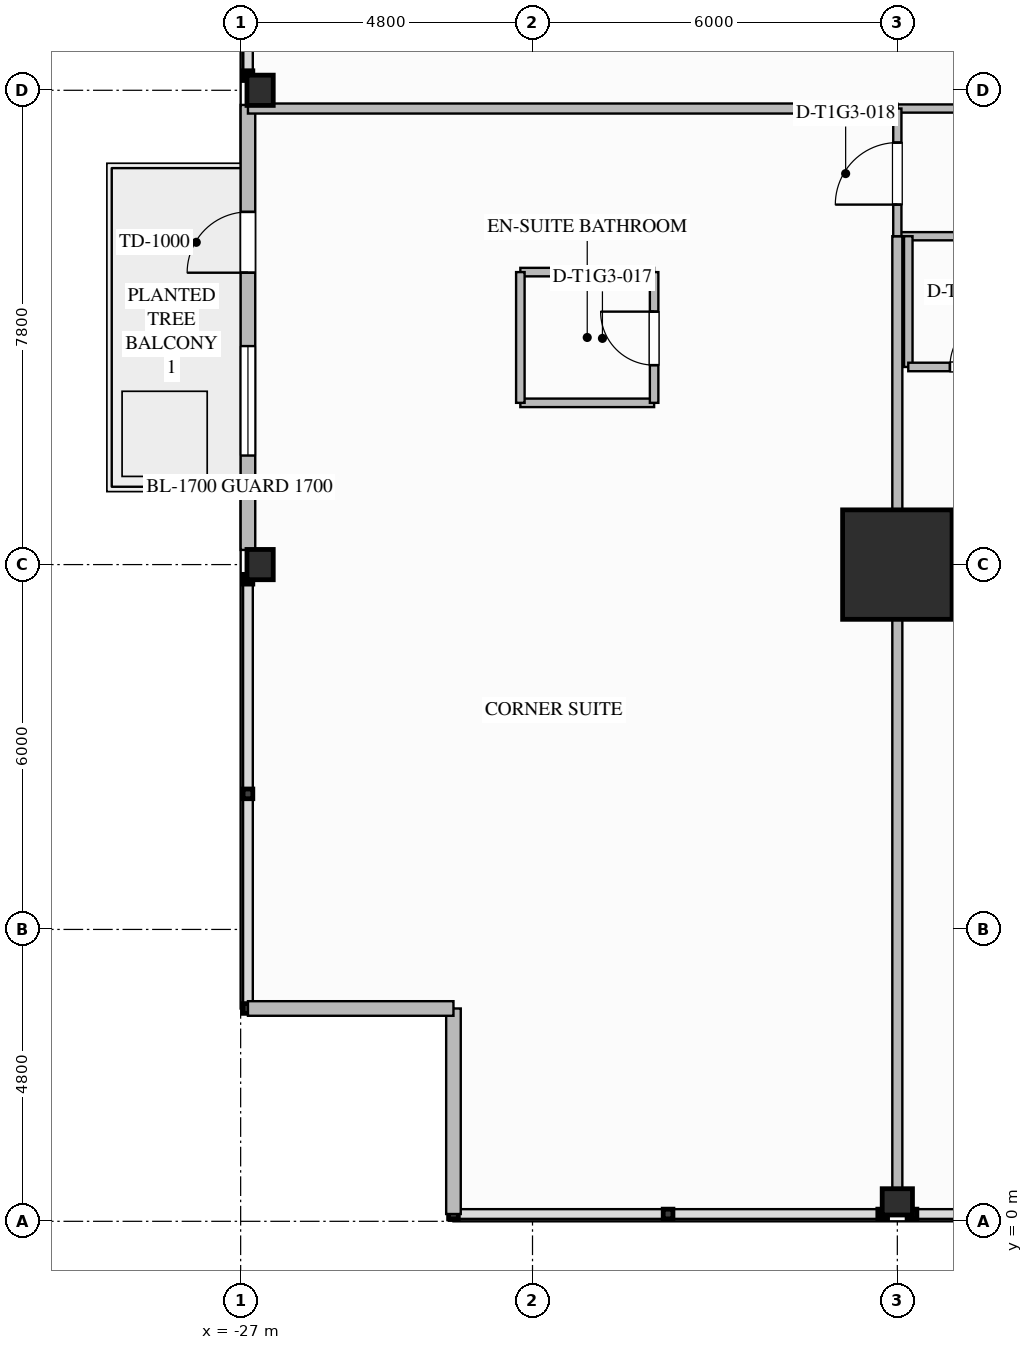
"""IFC4 building model, lengths in metres.
Left out: names, types, materials, properties, quantities, classifications, styles, units other than length and angle.
Written with IfcOpenShell. Run it as: python <this file> out.ifc"""

import sys

from ifc_helpers import new_model, si_unit, direction, frame, frame_2d, origin, origin_2d, place, context, subcontext, project, spatial, rectangle, i_section, extrude, element, fill, save


model = new_model("IFC4")
c1 = context("Model", 3, precision=1e-05, world=origin(), true_north=direction((0.0, 1.0)))
c2 = subcontext(c1, "Body", "Model", "MODEL_VIEW")
j1 = project(units=[si_unit("LENGTHUNIT", "METRE"), si_unit("PLANEANGLEUNIT", "RADIAN")], contexts=[c1])
p1 = place(None, origin())
s1 = spatial("IfcSite", under=j1, at=p1, CompositionType="ELEMENT")
p2 = place(p1, origin())
s2 = spatial("IfcBuilding", under=s1, at=p2, CompositionType="ELEMENT")
p3 = place(p2, frame((0.0, 0.0, 54.2)))
s3 = spatial("IfcBuildingStorey", under=s2, at=p3, CompositionType="ELEMENT", Elevation=54.2)
p4 = place(p3, frame((-16.2, 10.8, 0.0), z_axis=(0.0, 0.0, 1.0), x_axis=(1.0, 0.0, 0.0)))
e1 = element("IfcColumn", 1, at=p4, inside=s3, PredefinedType="COLUMN", context=c2, shape_type="SweptSolid", body=[
    extrude(rectangle(XDim=1.8, YDim=1.8, at=origin_2d()), origin(), (0.0, 0.0, 1.0), 3.5),
])
for number, where, z_axis, x_axis in (
    (2, (-26.68, 10.8, 0.0), (0.0, 0.0, 1.0), (1.0, 0.0, 0.0)),
    (3, (-26.68, 18.6, 0.0), (0.0, 0.0, 1.0), (1.0, 0.0, 0.0)),
    (4, (-16.2, 0.32, 0.0), (0.0, 0.0, 1.0), (0.0, 1.0, 0.0)),
):
    element("IfcColumn", number, at=place(p3, frame(where, z_axis=z_axis, x_axis=x_axis)), inside=s3, PredefinedType="COLUMN", context=c2, shape_type="SweptSolid", body=[
        extrude(i_section(OverallWidth=0.432, OverallDepth=0.498, WebThickness=0.056, FlangeThickness=0.089, FilletRadius=0.03, at=origin_2d()), origin(), (0.0, 0.0, 1.0), 3.497),
    ])
p5 = place(p3, frame((-26.88, 11.041, 0.0), z_axis=(0.0, 0.0, 1.0), x_axis=(0.0, 1.0, 0.0)))
e5 = element("IfcWall", 5, at=p5, inside=s3, PredefinedType="STANDARD", context=c2, shape_type="SweptSolid", body=[
    extrude(rectangle(XDim=7.318, YDim=0.24, at=frame_2d((3.659, 0.0))), origin(), (0.0, 0.0, 1.0), 2.629),
])
p6 = place(p5, frame((4.559, 0.0, 0.0)))
e6 = element("IfcOpeningElement", 6, at=p6, cuts=e5, PredefinedType="OPENING", context=c2, shape_type="SweptSolid", body=[
    extrude(rectangle(XDim=1.0, YDim=2.2, at=frame_2d((0.5, 1.1))), frame((0.0, 0.13, 0.0), z_axis=(0.0, -1.0, 0.0), x_axis=(1.0, 0.0, 0.0)), (0.0, 0.0, 1.0), 0.26),
])
p7 = place(p5, frame((1.552, 0.0, 0.75)))
e7 = element("IfcOpeningElement", 7, at=p7, cuts=e5, PredefinedType="OPENING", context=c2, shape_type="SweptSolid", body=[
    extrude(rectangle(XDim=1.8, YDim=1.779, at=frame_2d((0.9, 0.89))), frame((0.0, 0.13, 0.0), z_axis=(0.0, -1.0, 0.0), x_axis=(1.0, 0.0, 0.0)), (0.0, 0.0, 1.0), 0.26),
])
for number, where, z_axis, x_axis in (
    (8, (-23.5, 0.12, 0.0), (0.0, 0.0, 1.0), (0.0, 1.0, 0.0)),
    (9, (-23.5, 3.5, 0.0), (0.0, 0.0, 1.0), (-1.0, 0.0, 0.0)),
):
    element("IfcWall", number, at=place(p3, frame(where, z_axis=z_axis, x_axis=x_axis)), inside=s3, PredefinedType="STANDARD", context=c2, shape_type="SweptSolid", body=[
        extrude(rectangle(XDim=3.38, YDim=0.24, at=frame_2d((1.69, 0.0))), origin(), (0.0, 0.0, 1.0), 3.24),
    ])
p8 = place(p3, frame((-16.2, 16.2, 0.0), z_axis=(0.0, 0.0, 1.0), x_axis=(1.0, 0.0, 0.0)))
e10 = element("IfcWall", 10, at=p8, inside=s3, PredefinedType="PARTITIONING", context=c2, shape_type="SweptSolid", body=[
    extrude(rectangle(XDim=32.4, YDim=0.135, at=frame_2d((16.2, 0.0))), origin(), (0.0, 0.0, 1.0), 3.24),
])
p9 = place(p8, frame((3.285, 0.0, 0.0)))
e11 = element("IfcOpeningElement", 11, at=p9, cuts=e10, PredefinedType="OPENING", context=c2, shape_type="SweptSolid", body=[
    extrude(rectangle(XDim=1.26, YDim=2.2, at=frame_2d((0.63, 1.1))), frame((0.0, 0.077, 0.0), z_axis=(0.0, -1.0, 0.0), x_axis=(1.0, 0.0, 0.0)), (0.0, 0.0, 1.0), 0.155),
])
p10 = place(p8, frame((7.335, 0.0, 0.0)))
e12 = element("IfcOpeningElement", 12, at=p10, cuts=e10, PredefinedType="OPENING", context=c2, shape_type="SweptSolid", body=[
    extrude(rectangle(XDim=1.26, YDim=2.2, at=frame_2d((0.63, 1.1))), frame((0.0, 0.077, 0.0), z_axis=(0.0, -1.0, 0.0), x_axis=(1.0, 0.0, 0.0)), (0.0, 0.0, 1.0), 0.155),
])
p11 = place(p8, frame((15.84, 0.0, 0.0)))
e13 = element("IfcOpeningElement", 13, at=p11, cuts=e10, PredefinedType="OPENING", context=c2, shape_type="SweptSolid", body=[
    extrude(rectangle(XDim=1.26, YDim=2.2, at=frame_2d((0.63, 1.1))), frame((0.0, 0.077, 0.0), z_axis=(0.0, -1.0, 0.0), x_axis=(1.0, 0.0, 0.0)), (0.0, 0.0, 1.0), 0.155),
])
p12 = place(p8, frame((20.835, 0.0, 0.0)))
e14 = element("IfcOpeningElement", 14, at=p12, cuts=e10, PredefinedType="OPENING", context=c2, shape_type="SweptSolid", body=[
    extrude(rectangle(XDim=1.26, YDim=2.2, at=frame_2d((0.63, 1.1))), frame((0.0, 0.077, 0.0), z_axis=(0.0, -1.0, 0.0), x_axis=(1.0, 0.0, 0.0)), (0.0, 0.0, 1.0), 0.155),
])
p13 = place(p8, frame((29.475, 0.0, 0.0)))
e15 = element("IfcOpeningElement", 15, at=p13, cuts=e10, PredefinedType="OPENING", context=c2, shape_type="SweptSolid", body=[
    extrude(rectangle(XDim=1.26, YDim=2.2, at=frame_2d((0.63, 1.1))), frame((0.0, 0.077, 0.0), z_axis=(0.0, -1.0, 0.0), x_axis=(1.0, 0.0, 0.0)), (0.0, 0.0, 1.0), 0.155),
])
p14 = place(p3, frame((-16.2, 18.3, 0.0), z_axis=(0.0, 0.0, 1.0), x_axis=(1.0, 0.0, 0.0)))
e16 = element("IfcWall", 16, at=p14, inside=s3, PredefinedType="PARTITIONING", context=c2, shape_type="SweptSolid", body=[
    extrude(rectangle(XDim=5.4, YDim=0.135, at=frame_2d((2.7, 0.0))), origin(), (0.0, 0.0, 1.0), 3.24),
])
p15 = place(p3, frame((-16.2, 0.12, 0.0), z_axis=(0.0, 0.0, 1.0), x_axis=(0.0, 1.0, 0.0)))
e17 = element("IfcWall", 17, at=p15, inside=s3, PredefinedType="PARTITIONING", context=c2, shape_type="SweptSolid", body=[
    extrude(rectangle(XDim=16.08, YDim=0.165, at=frame_2d((8.04, 0.0))), origin(), (0.0, 0.0, 1.0), 2.298),
])
p16 = place(p3, frame((-26.88, 18.3, 0.0), z_axis=(0.0, 0.0, 1.0), x_axis=(1.0, 0.0, 0.0)))
e18 = element("IfcWall", 18, at=p16, inside=s3, PredefinedType="PARTITIONING", context=c2, shape_type="SweptSolid", body=[
    extrude(rectangle(XDim=10.68, YDim=0.165, at=frame_2d((5.34, 0.0))), origin(), (0.0, 0.0, 1.0), 2.298),
])
p17 = place(p3, frame((-16.2, 16.2, 0.0), z_axis=(0.0, 0.0, 1.0), x_axis=(0.0, 1.0, 0.0)))
e19 = element("IfcWall", 19, at=p17, inside=s3, PredefinedType="PARTITIONING", context=c2, shape_type="SweptSolid", body=[
    extrude(rectangle(XDim=2.1, YDim=0.135, at=frame_2d((1.05, 0.0))), origin(), (0.0, 0.0, 1.0), 2.298),
])
p18 = place(p17, frame((0.52, 0.0, 0.0)))
e20 = element("IfcOpeningElement", 20, at=p18, cuts=e19, PredefinedType="OPENING", context=c2, shape_type="SweptSolid", body=[
    extrude(rectangle(XDim=1.02, YDim=2.15, at=frame_2d((0.51, 1.075))), frame((0.0, 0.077, 0.0), z_axis=(0.0, -1.0, 0.0), x_axis=(1.0, 0.0, 0.0)), (0.0, 0.0, 1.0), 0.155),
])
for number, where, z_axis, x_axis in (
    (21, (-22.4, 13.46, 0.0), (0.0, 0.0, 1.0), (1.0, 0.0, 0.0)),
    (22, (-22.4, 15.61, 0.0), (0.0, 0.0, 1.0), (1.0, 0.0, 0.0)),
):
    element("IfcWall", number, at=place(p3, frame(where, z_axis=z_axis, x_axis=x_axis)), inside=s3, PredefinedType="PLUMBINGWALL", context=c2, shape_type="SweptSolid", body=[
        extrude(rectangle(XDim=2.2, YDim=0.14, at=frame_2d((1.1, 0.0))), origin(), (0.0, 0.0, 1.0), 3.24),
    ])
p19 = place(p3, frame((-22.4, 13.46, 0.0), z_axis=(0.0, 0.0, 1.0), x_axis=(0.0, 1.0, 0.0)))
e23 = element("IfcWall", 23, at=p19, inside=s3, PredefinedType="PLUMBINGWALL", context=c2, shape_type="SweptSolid", body=[
    extrude(rectangle(XDim=2.15, YDim=0.14, at=frame_2d((1.075, 0.0))), origin(), (0.0, 0.0, 1.0), 3.24),
])
p20 = place(p3, frame((-20.2, 13.46, 0.0), z_axis=(0.0, 0.0, 1.0), x_axis=(0.0, 1.0, 0.0)))
e24 = element("IfcWall", 24, at=p20, inside=s3, PredefinedType="PLUMBINGWALL", context=c2, shape_type="SweptSolid", body=[
    extrude(rectangle(XDim=2.15, YDim=0.14, at=frame_2d((1.075, 0.0))), origin(), (0.0, 0.0, 1.0), 3.24),
])
p21 = place(p20, frame((0.62, 0.0, 0.0)))
e25 = element("IfcOpeningElement", 25, at=p21, cuts=e24, PredefinedType="OPENING", context=c2, shape_type="SweptSolid", body=[
    extrude(rectangle(XDim=0.88, YDim=2.1, at=frame_2d((0.44, 1.05))), frame((0.0, 0.08, 0.0), z_axis=(0.0, -1.0, 0.0), x_axis=(1.0, 0.0, 0.0)), (0.0, 0.0, 1.0), 0.16),
])
p22 = place(p3, frame((-16.02, 16.2, 0.0), z_axis=(0.0, 0.0, 1.0), x_axis=(0.0, -1.0, 0.0)))
e26 = element("IfcWall", 26, at=p22, inside=s3, PredefinedType="PLUMBINGWALL", context=c2, shape_type="SweptSolid", body=[
    extrude(rectangle(XDim=2.15, YDim=0.14, at=frame_2d((1.075, 0.0))), origin(), (0.0, 0.0, 1.0), 2.298),
])
p23 = place(p3, frame((-16.02, 14.05, 0.0), z_axis=(0.0, 0.0, 1.0), x_axis=(1.0, 0.0, 0.0)))
e27 = element("IfcWall", 27, at=p23, inside=s3, PredefinedType="PLUMBINGWALL", context=c2, shape_type="SweptSolid", body=[
    extrude(rectangle(XDim=2.25, YDim=0.14, at=frame_2d((1.125, 0.0))), origin(), (0.0, 0.0, 1.0), 3.24),
])
p24 = place(p23, frame((0.685, 0.0, 0.0)))
e28 = element("IfcOpeningElement", 28, at=p24, cuts=e27, PredefinedType="OPENING", context=c2, shape_type="SweptSolid", body=[
    extrude(rectangle(XDim=0.88, YDim=2.1, at=frame_2d((0.44, 1.05))), frame((0.0, 0.08, 0.0), z_axis=(0.0, -1.0, 0.0), x_axis=(1.0, 0.0, 0.0)), (0.0, 0.0, 1.0), 0.16),
])
p25 = place(p6, origin())
e29 = element("IfcDoor", 29, at=p25, inside=s3, OperationType="SINGLE_SWING_LEFT", PredefinedType="DOOR", context=c2, shape_type="SweptSolid", body=[
    extrude(rectangle(XDim=1.0, YDim=2.2, at=frame_2d((0.5, 1.1))), frame((0.0, 0.025, 0.0), z_axis=(0.0, -1.0, 0.0), x_axis=(1.0, 0.0, 0.0)), (0.0, 0.0, 1.0), 0.05),
])
fill(e6, e29)
p26 = place(p7, origin())
e30 = element("IfcWindow", 30, at=p26, inside=s3, PartitioningType="SINGLE_PANEL", PredefinedType="WINDOW", context=c2, shape_type="SweptSolid", body=[
    extrude(rectangle(XDim=1.8, YDim=1.779, at=frame_2d((0.9, 0.89))), frame((0.0, 0.03, 0.0), z_axis=(0.0, -1.0, 0.0), x_axis=(1.0, 0.0, 0.0)), (0.0, 0.0, 1.0), 0.06),
])
fill(e7, e30)
p27 = place(p21, origin())
e31 = element("IfcDoor", 31, at=p27, inside=s3, OperationType="SINGLE_SWING_RIGHT", PredefinedType="DOOR", context=c2, shape_type="SweptSolid", body=[
    extrude(rectangle(XDim=0.88, YDim=2.1, at=frame_2d((0.44, 1.05))), frame((0.0, 0.025, 0.0), z_axis=(0.0, -1.0, 0.0), x_axis=(1.0, 0.0, 0.0)), (0.0, 0.0, 1.0), 0.05),
])
fill(e25, e31)
p28 = place(p18, origin())
e32 = element("IfcDoor", 32, at=p28, inside=s3, OperationType="SINGLE_SWING_LEFT", PredefinedType="DOOR", context=c2, shape_type="SweptSolid", body=[
    extrude(rectangle(XDim=1.02, YDim=2.15, at=frame_2d((0.51, 1.075))), frame((0.0, 0.025, 0.0), z_axis=(0.0, -1.0, 0.0), x_axis=(1.0, 0.0, 0.0)), (0.0, 0.0, 1.0), 0.05),
])
fill(e20, e32)
p29 = place(p24, origin())
e33 = element("IfcDoor", 33, at=p29, inside=s3, OperationType="SINGLE_SWING_RIGHT", PredefinedType="DOOR", context=c2, shape_type="SweptSolid", body=[
    extrude(rectangle(XDim=0.88, YDim=2.1, at=frame_2d((0.44, 1.05))), frame((0.0, 0.025, 0.0), z_axis=(0.0, -1.0, 0.0), x_axis=(1.0, 0.0, 0.0)), (0.0, 0.0, 1.0), 0.05),
])
fill(e28, e33)
save(model, sys.argv[1])
